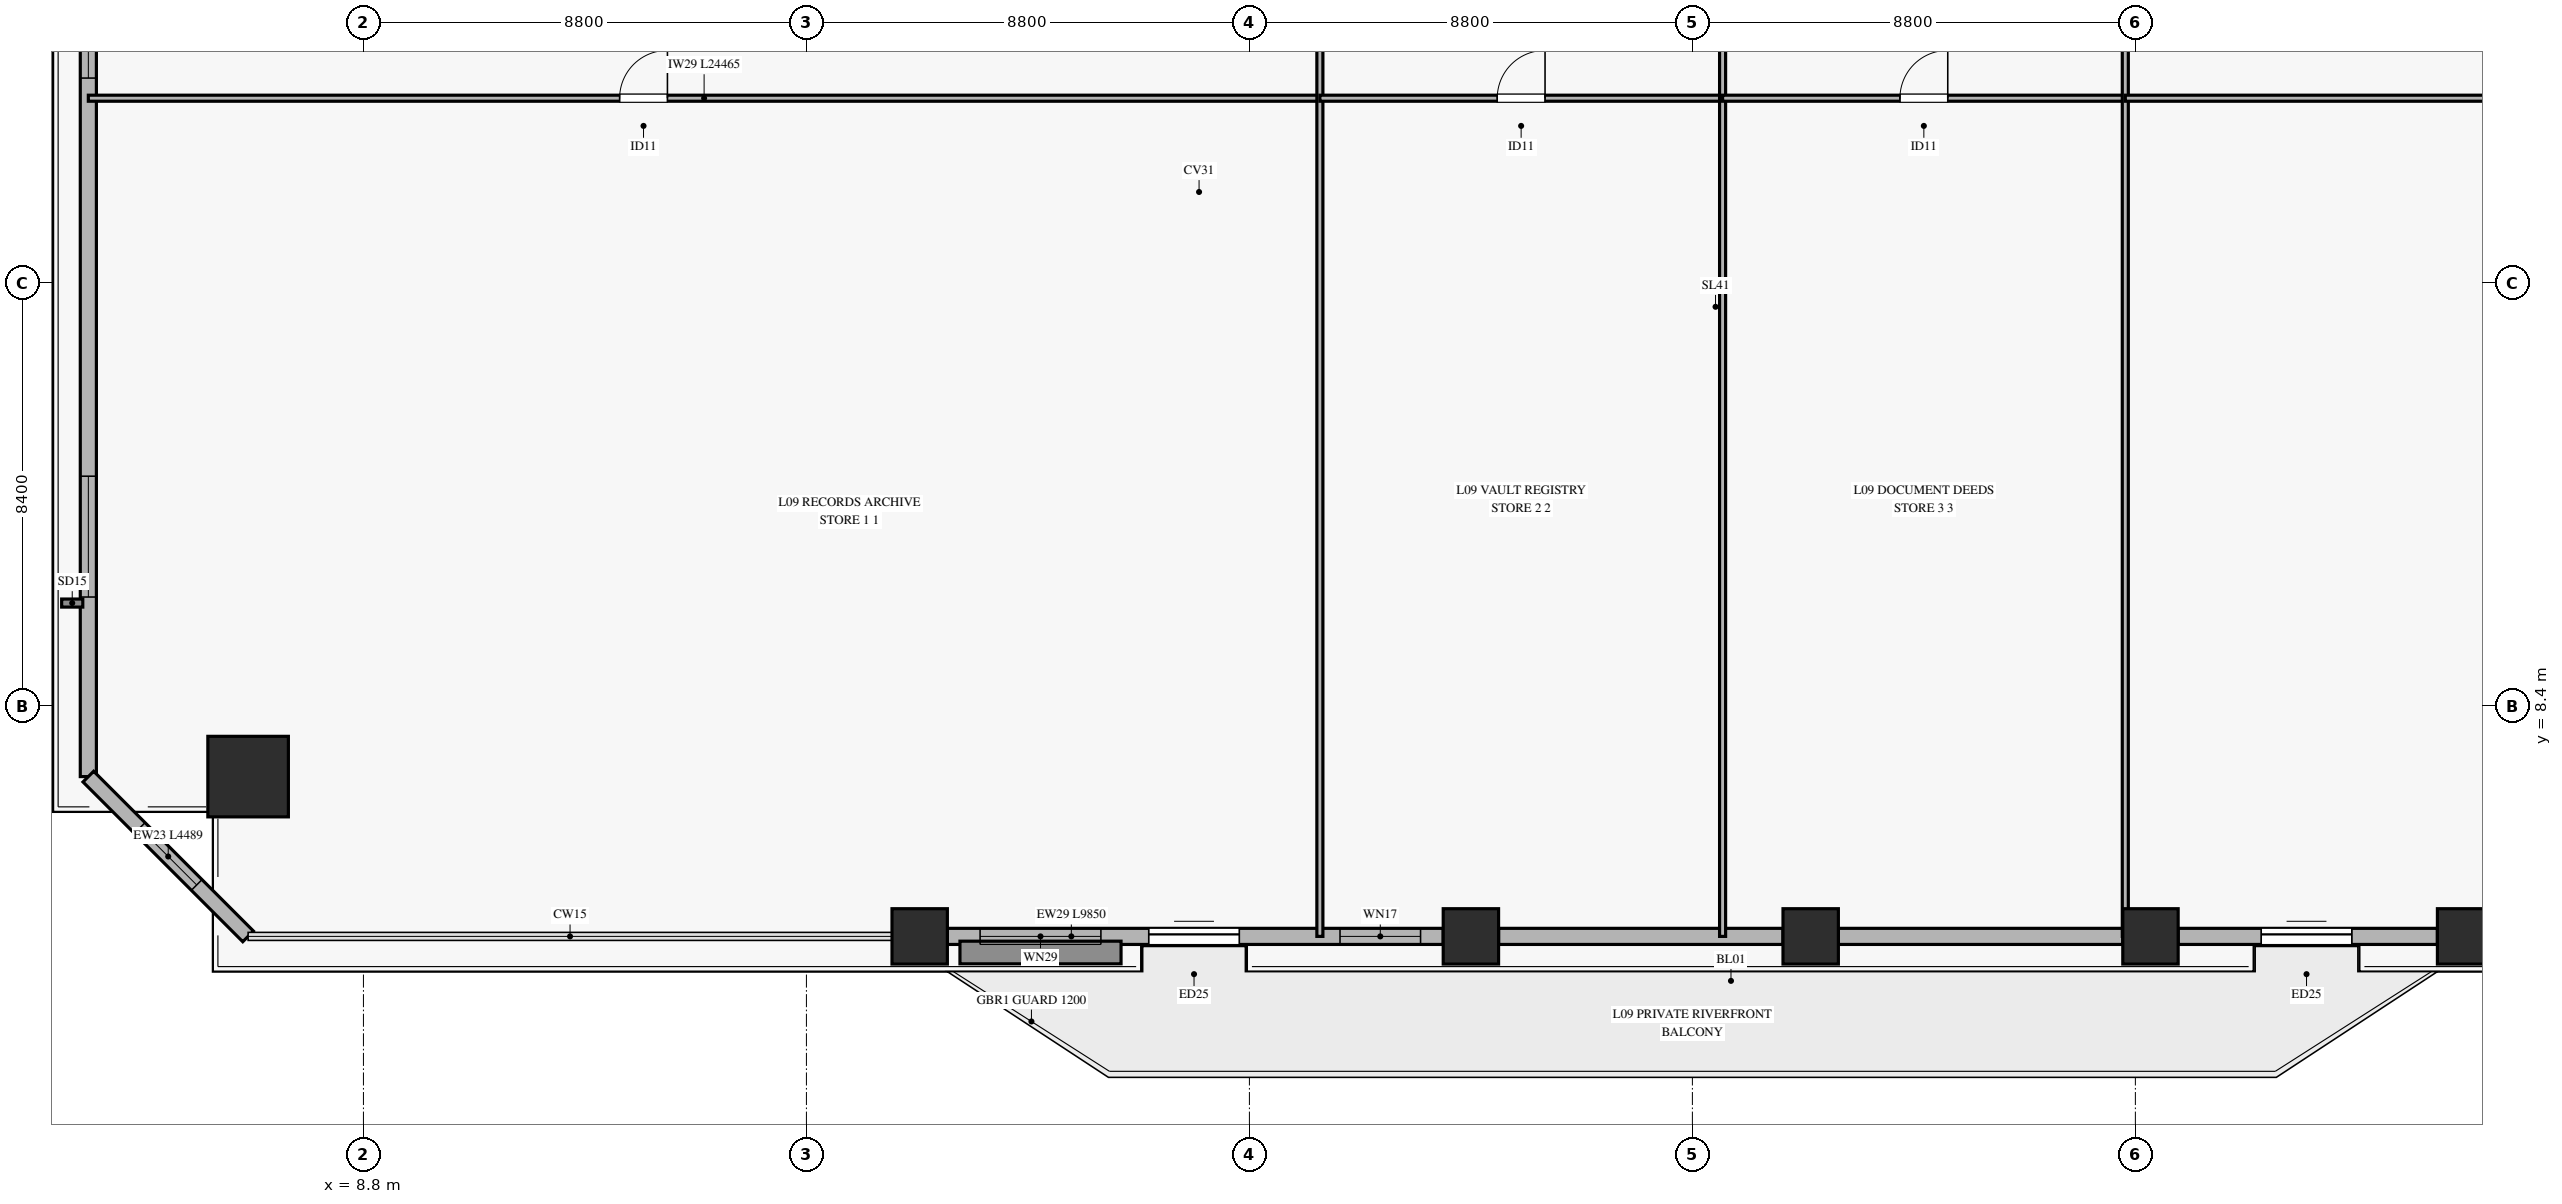
"""IFC4 building model, lengths in metres.
Left out: names, types, materials, properties, quantities, classifications, styles, units other than length and angle.
Written with IfcOpenShell. Run it as: python <this file> out.ifc"""

import sys

from ifc_helpers import new_model, si_unit, direction, frame, frame_2d, origin, origin_2d, place, context, subcontext, project, spatial, rectangle, hollow_rectangle, extrude, source, transform, mapped, element, fill, save


model = new_model("IFC4")
c1 = context("Model", 3, precision=1e-05, world=origin(), true_north=direction((0.0, 1.0)))
c2 = subcontext(c1, "Body", "Model", "MODEL_VIEW")
j1 = project(units=[si_unit("LENGTHUNIT", "METRE"), si_unit("PLANEANGLEUNIT", "RADIAN")], contexts=[c1])
p1 = place(None, origin())
s1 = spatial("IfcSite", under=j1, at=p1, CompositionType="ELEMENT")
p2 = place(p1, origin())
s2 = spatial("IfcBuilding", under=s1, at=p2, CompositionType="ELEMENT")
p3 = place(p2, frame((0.0, 0.0, 37.1)))
s3 = spatial("IfcBuildingStorey", under=s2, at=p3, CompositionType="ELEMENT", Elevation=37.1)
m1 = source(origin(), c2, "Body", "SweptSolid", [
    extrude(hollow_rectangle(XDim=1.6, YDim=1.6, WallThickness=0.075, at=origin_2d()), origin(), (0.0, 0.0, 1.0), 3.68),
])
p4 = place(p3, frame((6.509, 7.001, 0.0), z_axis=(0.0, 0.0, 1.0), x_axis=(1.0, 0.0, 0.0)))
e1 = element("IfcColumn", 1, at=p4, inside=s3, PredefinedType="COLUMN", context=c2, shape_type="MappedRepresentation", body=[
    mapped(m1, transform((0.0, 0.0, 0.0), x_axis=(1.0, 0.0, 0.0), y_axis=(0.0, 1.0, 0.0), z_axis=(0.0, 0.0, 1.0), scale=1.0)),
])
m2 = source(origin(), c2, "Body", "SweptSolid", [
    extrude(hollow_rectangle(XDim=1.1, YDim=1.1, WallThickness=0.05, at=origin_2d()), origin(), (0.0, 0.0, 1.0), 3.68),
])
for number, where, z_axis, x_axis in (
    (2, (19.85, 3.827, 0.0), (0.0, 0.0, 1.0), (1.0, 0.0, 0.0)),
    (3, (30.8, 3.827, 0.0), (0.0, 0.0, 1.0), (1.0, 0.0, 0.0)),
    (4, (37.55, 3.827, 0.0), (0.0, 0.0, 1.0), (1.0, 0.0, 0.0)),
    (5, (44.3, 3.827, 0.0), (0.0, 0.0, 1.0), (1.0, 0.0, 0.0)),
    (6, (50.55, 3.827, 0.0), (0.0, 0.0, 1.0), (1.0, 0.0, 0.0)),
):
    element("IfcColumn", number, at=place(p3, frame(where, z_axis=z_axis, x_axis=x_axis)), inside=s3, PredefinedType="COLUMN", context=c2, shape_type="MappedRepresentation", body=[
        mapped(m2, transform((0.0, 0.0, 0.0), x_axis=(1.0, 0.0, 0.0), y_axis=(0.0, 1.0, 0.0), z_axis=(0.0, 0.0, 1.0), scale=1.0)),
    ])
p5 = place(p3, frame((20.4, 3.827, 0.0), z_axis=(0.0, 0.0, 1.0), x_axis=(1.0, 0.0, 0.0)))
e7 = element("IfcWall", 7, at=p5, inside=s3, PredefinedType="SOLIDWALL", context=c2, shape_type="SweptSolid", body=[
    extrude(rectangle(XDim=9.85, YDim=0.32, at=frame_2d((4.925, 0.0))), origin(), (0.0, 0.0, 1.0), 3.16),
])
p6 = place(p5, frame((4.0, 0.0, 0.0)))
e8 = element("IfcOpeningElement", 8, at=p6, cuts=e7, PredefinedType="OPENING", context=c2, shape_type="SweptSolid", body=[
    extrude(rectangle(XDim=1.8, YDim=2.25, at=frame_2d((0.9, 1.125))), frame((0.0, 0.17, 0.0), z_axis=(0.0, -1.0, 0.0), x_axis=(1.0, 0.0, 0.0)), (0.0, 0.0, 1.0), 0.34),
])
p7 = place(p5, frame((0.65, 0.0, 0.45)))
e9 = element("IfcOpeningElement", 9, at=p7, cuts=e7, PredefinedType="OPENING", context=c2, shape_type="SweptSolid", body=[
    extrude(rectangle(XDim=2.4, YDim=2.1, at=frame_2d((1.2, 1.05))), frame((0.0, 0.17, 0.0), z_axis=(0.0, -1.0, 0.0), x_axis=(1.0, 0.0, 0.0)), (0.0, 0.0, 1.0), 0.34),
])
p8 = place(p5, frame((7.8, 0.0, 0.45)))
e10 = element("IfcOpeningElement", 10, at=p8, cuts=e7, PredefinedType="OPENING", context=c2, shape_type="SweptSolid", body=[
    extrude(rectangle(XDim=1.6, YDim=2.0, at=frame_2d((0.8, 1.0))), frame((0.0, 0.17, 0.0), z_axis=(0.0, -1.0, 0.0), x_axis=(1.0, 0.0, 0.0)), (0.0, 0.0, 1.0), 0.34),
])
for number, where, z_axis, x_axis in (
    (11, (31.35, 3.827, 0.0), (0.0, 0.0, 1.0), (1.0, 0.0, 0.0)),
    (12, (38.1, 3.827, 0.0), (0.0, 0.0, 1.0), (1.0, 0.0, 0.0)),
):
    element("IfcWall", number, at=place(p3, frame(where, z_axis=z_axis, x_axis=x_axis)), inside=s3, PredefinedType="SOLIDWALL", context=c2, shape_type="SweptSolid", body=[
        extrude(rectangle(XDim=5.65, YDim=0.32, at=frame_2d((2.825, 0.0))), origin(), (0.0, 0.0, 1.0), 3.16),
    ])
p9 = place(p3, frame((44.85, 3.827, 0.0), z_axis=(0.0, 0.0, 1.0), x_axis=(1.0, 0.0, 0.0)))
e13 = element("IfcWall", 13, at=p9, inside=s3, PredefinedType="SOLIDWALL", context=c2, shape_type="SweptSolid", body=[
    extrude(rectangle(XDim=5.15, YDim=0.32, at=frame_2d((2.575, 0.0))), origin(), (0.0, 0.0, 1.0), 3.16),
])
p10 = place(p9, frame((1.65, 0.0, 0.0)))
e14 = element("IfcOpeningElement", 14, at=p10, cuts=e13, PredefinedType="OPENING", context=c2, shape_type="SweptSolid", body=[
    extrude(rectangle(XDim=1.8, YDim=2.25, at=frame_2d((0.9, 1.125))), frame((0.0, 0.17, 0.0), z_axis=(0.0, -1.0, 0.0), x_axis=(1.0, 0.0, 0.0)), (0.0, 0.0, 1.0), 0.34),
])
p11 = place(p3, frame((3.335, 7.001, 0.0), z_axis=(0.0, 0.0, 1.0), x_axis=(0.0, 1.0, 0.0)))
e15 = element("IfcWall", 15, at=p11, inside=s3, PredefinedType="SOLIDWALL", context=c2, shape_type="SweptSolid", body=[
    extrude(rectangle(XDim=17.412, YDim=0.32, at=frame_2d((8.706, 0.0))), origin(), (0.0, 0.0, 1.0), 3.16),
])
p12 = place(p11, frame((3.567, 0.0, 0.45)))
e16 = element("IfcOpeningElement", 16, at=p12, cuts=e15, PredefinedType="OPENING", context=c2, shape_type="SweptSolid", body=[
    extrude(rectangle(XDim=2.4, YDim=2.1, at=frame_2d((1.2, 1.05))), frame((0.0, 0.17, 0.0), z_axis=(0.0, -1.0, 0.0), x_axis=(1.0, 0.0, 0.0)), (0.0, 0.0, 1.0), 0.34),
])
p13 = place(p11, frame((13.875, 0.0, 0.45)))
e17 = element("IfcOpeningElement", 17, at=p13, cuts=e15, PredefinedType="OPENING", context=c2, shape_type="SweptSolid", body=[
    extrude(rectangle(XDim=2.4, YDim=2.1, at=frame_2d((1.2, 1.05))), frame((0.0, 0.17, 0.0), z_axis=(0.0, -1.0, 0.0), x_axis=(1.0, 0.0, 0.0)), (0.0, 0.0, 1.0), 0.34),
])
p14 = place(p3, frame((3.335, 7.001, 0.0), z_axis=(0.0, 0.0, 1.0), x_axis=(0.707106781187, -0.707106781187, 0.0)))
e18 = element("IfcWall", 18, at=p14, inside=s3, PredefinedType="SOLIDWALL", context=c2, shape_type="SweptSolid", body=[
    extrude(rectangle(XDim=4.489, YDim=0.3, at=frame_2d((2.244, 0.0))), origin(), (0.0, 0.0, 1.0), 3.16),
])
p15 = place(p14, frame((1.444, 0.0, 0.45)))
e19 = element("IfcOpeningElement", 19, at=p15, cuts=e18, PredefinedType="OPENING", context=c2, shape_type="SweptSolid", body=[
    extrude(rectangle(XDim=1.6, YDim=2.0, at=frame_2d((0.8, 1.0))), frame((0.0, 0.16, 0.0), z_axis=(0.0, -1.0, 0.0), x_axis=(1.0, 0.0, 0.0)), (0.0, 0.0, 1.0), 0.32),
])
p16 = place(p3, frame((3.335, 20.476, 0.0), z_axis=(0.0, 0.0, 1.0), x_axis=(1.0, 0.0, 0.0)))
e20 = element("IfcWall", 20, at=p16, inside=s3, PredefinedType="PARTITIONING", context=c2, shape_type="SweptSolid", body=[
    extrude(rectangle(XDim=24.465, YDim=0.12, at=frame_2d((12.232, 0.0))), origin(), (0.0, 0.0, 1.0), 2.765),
])
p17 = place(p16, frame((10.554, 0.0, 0.0)))
e21 = element("IfcOpeningElement", 21, at=p17, cuts=e20, PredefinedType="OPENING", context=c2, shape_type="SweptSolid", body=[
    extrude(rectangle(XDim=0.95, YDim=2.1, at=frame_2d((0.475, 1.05))), frame((0.0, 0.07, 0.0), z_axis=(0.0, -1.0, 0.0), x_axis=(1.0, 0.0, 0.0)), (0.0, 0.0, 1.0), 0.14),
])
p18 = place(p3, frame((27.8, 3.827, 0.0), z_axis=(0.0, 0.0, 1.0), x_axis=(0.0, 1.0, 0.0)))
e22 = element("IfcWall", 22, at=p18, inside=s3, PredefinedType="PARTITIONING", context=c2, shape_type="SweptSolid", body=[
    extrude(rectangle(XDim=29.573, YDim=0.12, at=frame_2d((14.787, 0.0))), origin(), (0.0, 0.0, 1.0), 3.165),
])
p19 = place(p3, frame((27.8, 20.476, 0.0), z_axis=(0.0, 0.0, 1.0), x_axis=(1.0, 0.0, 0.0)))
e23 = element("IfcWall", 23, at=p19, inside=s3, PredefinedType="PARTITIONING", context=c2, shape_type="SweptSolid", body=[
    extrude(rectangle(XDim=8.0, YDim=0.12, at=frame_2d((4.0, 0.0))), origin(), (0.0, 0.0, 1.0), 2.765),
])
p20 = place(p19, frame((3.523, 0.0, 0.0)))
e24 = element("IfcOpeningElement", 24, at=p20, cuts=e23, PredefinedType="OPENING", context=c2, shape_type="SweptSolid", body=[
    extrude(rectangle(XDim=0.95, YDim=2.1, at=frame_2d((0.475, 1.05))), frame((0.0, 0.07, 0.0), z_axis=(0.0, -1.0, 0.0), x_axis=(1.0, 0.0, 0.0)), (0.0, 0.0, 1.0), 0.14),
])
p21 = place(p3, frame((35.8, 3.827, 0.0), z_axis=(0.0, 0.0, 1.0), x_axis=(0.0, 1.0, 0.0)))
e25 = element("IfcWall", 25, at=p21, inside=s3, PredefinedType="PARTITIONING", context=c2, shape_type="SweptSolid", body=[
    extrude(rectangle(XDim=29.573, YDim=0.12, at=frame_2d((14.787, 0.0))), origin(), (0.0, 0.0, 1.0), 3.165),
])
p22 = place(p3, frame((35.8, 20.476, 0.0), z_axis=(0.0, 0.0, 1.0), x_axis=(1.0, 0.0, 0.0)))
e26 = element("IfcWall", 26, at=p22, inside=s3, PredefinedType="PARTITIONING", context=c2, shape_type="SweptSolid", body=[
    extrude(rectangle(XDim=8.0, YDim=0.12, at=frame_2d((4.0, 0.0))), origin(), (0.0, 0.0, 1.0), 2.765),
])
p23 = place(p22, frame((3.523, 0.0, 0.0)))
e27 = element("IfcOpeningElement", 27, at=p23, cuts=e26, PredefinedType="OPENING", context=c2, shape_type="SweptSolid", body=[
    extrude(rectangle(XDim=0.95, YDim=2.1, at=frame_2d((0.475, 1.05))), frame((0.0, 0.07, 0.0), z_axis=(0.0, -1.0, 0.0), x_axis=(1.0, 0.0, 0.0)), (0.0, 0.0, 1.0), 0.14),
])
p24 = place(p3, frame((43.8, 3.827, 0.0), z_axis=(0.0, 0.0, 1.0), x_axis=(0.0, 1.0, 0.0)))
e28 = element("IfcWall", 28, at=p24, inside=s3, PredefinedType="PARTITIONING", context=c2, shape_type="SweptSolid", body=[
    extrude(rectangle(XDim=29.573, YDim=0.12, at=frame_2d((14.787, 0.0))), origin(), (0.0, 0.0, 1.0), 3.215),
])
p25 = place(p3, frame((43.8, 20.476, 0.0), z_axis=(0.0, 0.0, 1.0), x_axis=(1.0, 0.0, 0.0)))
e29 = element("IfcWall", 29, at=p25, inside=s3, PredefinedType="PARTITIONING", context=c2, shape_type="SweptSolid", body=[
    extrude(rectangle(XDim=23.265, YDim=0.12, at=frame_2d((11.632, 0.0))), origin(), (0.0, 0.0, 1.0), 2.765),
])
p26 = place(p25, frame((9.85, 0.0, 0.0)))
e30 = element("IfcOpeningElement", 30, at=p26, cuts=e29, PredefinedType="OPENING", context=c2, shape_type="SweptSolid", body=[
    extrude(rectangle(XDim=0.95, YDim=2.1, at=frame_2d((0.475, 1.05))), frame((0.0, 0.07, 0.0), z_axis=(0.0, -1.0, 0.0), x_axis=(1.0, 0.0, 0.0)), (0.0, 0.0, 1.0), 0.14),
])
m3 = source(origin(), c2, "Body", "SweptSolid", [
    extrude(rectangle(XDim=1.8, YDim=2.25, at=frame_2d((0.9, 1.125))), frame((0.0, 0.025, 0.0), z_axis=(0.0, -1.0, 0.0), x_axis=(1.0, 0.0, 0.0)), (0.0, 0.0, 1.0), 0.05),
])
p27 = place(p6, origin())
e31 = element("IfcDoor", 31, at=p27, inside=s3, OperationType="SLIDING_TO_LEFT", PredefinedType="DOOR", context=c2, shape_type="MappedRepresentation", body=[
    mapped(m3, transform((0.0, 0.0, 0.0), x_axis=(1.0, 0.0, 0.0), y_axis=(0.0, 1.0, 0.0), z_axis=(0.0, 0.0, 1.0), scale=1.0)),
])
fill(e8, e31)
m4 = source(origin(), c2, "Body", "SweptSolid", [
    extrude(rectangle(XDim=2.4, YDim=2.1, at=frame_2d((1.2, 1.05))), frame((0.0, 0.03, 0.0), z_axis=(0.0, -1.0, 0.0), x_axis=(1.0, 0.0, 0.0)), (0.0, 0.0, 1.0), 0.06),
])
p28 = place(p7, origin())
e32 = element("IfcWindow", 32, at=p28, inside=s3, PartitioningType="SINGLE_PANEL", PredefinedType="WINDOW", context=c2, shape_type="MappedRepresentation", body=[
    mapped(m4, transform((0.0, 0.0, 0.0), x_axis=(1.0, 0.0, 0.0), y_axis=(0.0, 1.0, 0.0), z_axis=(0.0, 0.0, 1.0), scale=1.0)),
])
fill(e9, e32)
m5 = source(origin(), c2, "Body", "SweptSolid", [
    extrude(rectangle(XDim=1.6, YDim=2.0, at=frame_2d((0.8, 1.0))), frame((0.0, 0.03, 0.0), z_axis=(0.0, -1.0, 0.0), x_axis=(1.0, 0.0, 0.0)), (0.0, 0.0, 1.0), 0.06),
])
p29 = place(p8, origin())
e33 = element("IfcWindow", 33, at=p29, inside=s3, PartitioningType="SINGLE_PANEL", PredefinedType="WINDOW", context=c2, shape_type="MappedRepresentation", body=[
    mapped(m5, transform((0.0, 0.0, 0.0), x_axis=(1.0, 0.0, 0.0), y_axis=(0.0, 1.0, 0.0), z_axis=(0.0, 0.0, 1.0), scale=1.0)),
])
fill(e10, e33)
p30 = place(p10, origin())
e34 = element("IfcDoor", 34, at=p30, inside=s3, OperationType="SLIDING_TO_LEFT", PredefinedType="DOOR", context=c2, shape_type="MappedRepresentation", body=[
    mapped(m3, transform((0.0, 0.0, 0.0), x_axis=(1.0, 0.0, 0.0), y_axis=(0.0, 1.0, 0.0), z_axis=(0.0, 0.0, 1.0), scale=1.0)),
])
fill(e14, e34)
p31 = place(p12, origin())
e35 = element("IfcWindow", 35, at=p31, inside=s3, PartitioningType="SINGLE_PANEL", PredefinedType="WINDOW", context=c2, shape_type="MappedRepresentation", body=[
    mapped(m4, transform((0.0, 0.0, 0.0), x_axis=(1.0, 0.0, 0.0), y_axis=(0.0, 1.0, 0.0), z_axis=(0.0, 0.0, 1.0), scale=1.0)),
])
fill(e16, e35)
p32 = place(p13, origin())
e36 = element("IfcWindow", 36, at=p32, inside=s3, PartitioningType="SINGLE_PANEL", PredefinedType="WINDOW", context=c2, shape_type="MappedRepresentation", body=[
    mapped(m4, transform((0.0, 0.0, 0.0), x_axis=(1.0, 0.0, 0.0), y_axis=(0.0, 1.0, 0.0), z_axis=(0.0, 0.0, 1.0), scale=1.0)),
])
fill(e17, e36)
p33 = place(p15, origin())
e37 = element("IfcWindow", 37, at=p33, inside=s3, PartitioningType="SINGLE_PANEL", PredefinedType="WINDOW", context=c2, shape_type="MappedRepresentation", body=[
    mapped(m5, transform((0.0, 0.0, 0.0), x_axis=(1.0, 0.0, 0.0), y_axis=(0.0, 1.0, 0.0), z_axis=(0.0, 0.0, 1.0), scale=1.0)),
])
fill(e19, e37)
m6 = source(origin(), c2, "Body", "SweptSolid", [
    extrude(rectangle(XDim=0.95, YDim=2.1, at=frame_2d((0.475, 1.05))), frame((0.0, 0.025, 0.0), z_axis=(0.0, -1.0, 0.0), x_axis=(1.0, 0.0, 0.0)), (0.0, 0.0, 1.0), 0.05),
])
p34 = place(p17, origin())
e38 = element("IfcDoor", 38, at=p34, inside=s3, OperationType="SINGLE_SWING_RIGHT", PredefinedType="DOOR", context=c2, shape_type="MappedRepresentation", body=[
    mapped(m6, transform((0.0, 0.0, 0.0), x_axis=(1.0, 0.0, 0.0), y_axis=(0.0, 1.0, 0.0), z_axis=(0.0, 0.0, 1.0), scale=1.0)),
])
fill(e21, e38)
p35 = place(p20, origin())
e39 = element("IfcDoor", 39, at=p35, inside=s3, OperationType="SINGLE_SWING_RIGHT", PredefinedType="DOOR", context=c2, shape_type="MappedRepresentation", body=[
    mapped(m6, transform((0.0, 0.0, 0.0), x_axis=(1.0, 0.0, 0.0), y_axis=(0.0, 1.0, 0.0), z_axis=(0.0, 0.0, 1.0), scale=1.0)),
])
fill(e24, e39)
p36 = place(p23, origin())
e40 = element("IfcDoor", 40, at=p36, inside=s3, OperationType="SINGLE_SWING_RIGHT", PredefinedType="DOOR", context=c2, shape_type="MappedRepresentation", body=[
    mapped(m6, transform((0.0, 0.0, 0.0), x_axis=(1.0, 0.0, 0.0), y_axis=(0.0, 1.0, 0.0), z_axis=(0.0, 0.0, 1.0), scale=1.0)),
])
fill(e27, e40)
save(model, sys.argv[1])
